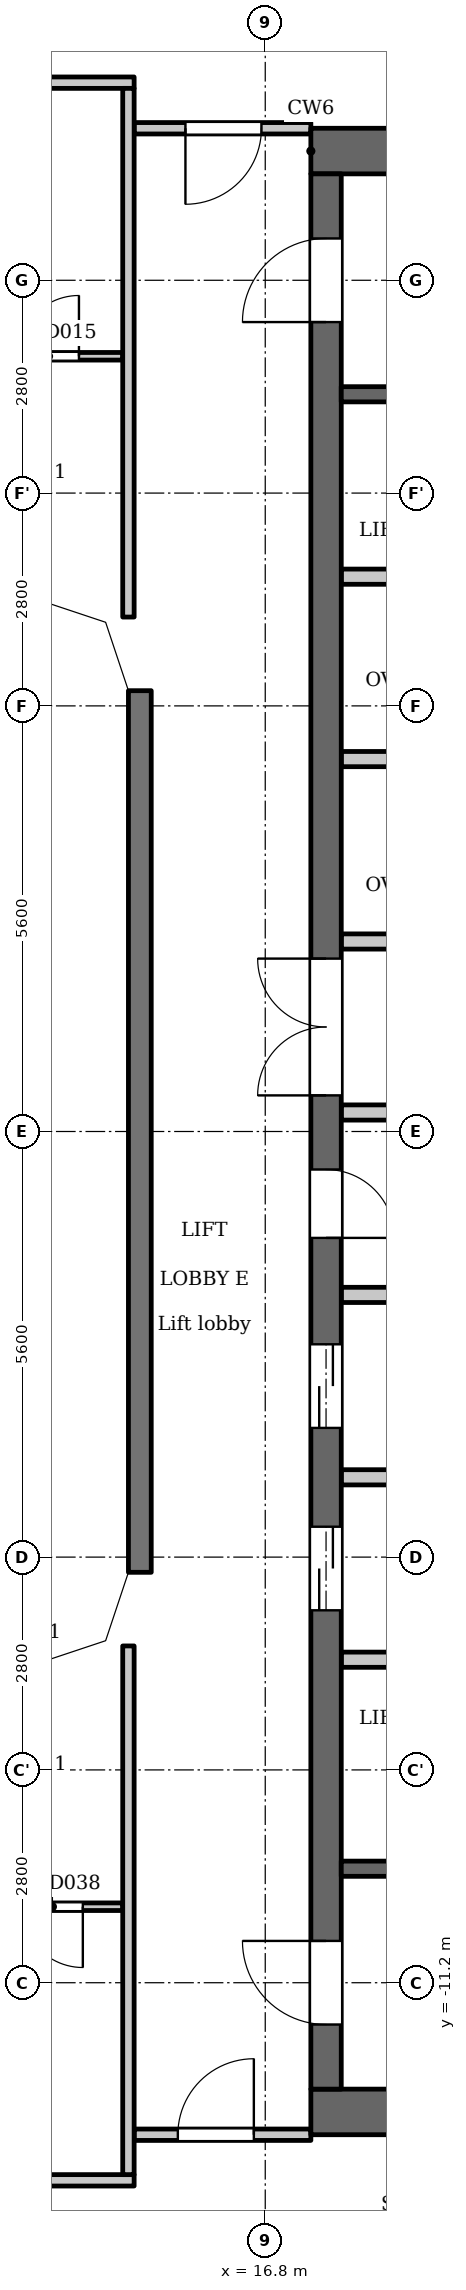
"""IFC4 building model, lengths in metres.
Left out: names, types, materials, properties, quantities, classifications, styles, units other than length and angle.
Written with IfcOpenShell. Run it as: python <this file> out.ifc"""

import sys

from ifc_helpers import new_model, si_unit, direction, frame, frame_2d, origin, place, context, subcontext, project, spatial, polyline, rectangle, outline, extrude, element, fill, save


model = new_model("IFC4")
c1 = context("Model", 3, precision=1e-05, world=origin(), true_north=direction((0.0, 1.0)))
c2 = subcontext(c1, "Body", "Model", "MODEL_VIEW")
j1 = project(units=[si_unit("LENGTHUNIT", "METRE"), si_unit("PLANEANGLEUNIT", "RADIAN")], contexts=[c1])
p1 = place(None, origin())
s1 = spatial("IfcSite", under=j1, at=p1, CompositionType="ELEMENT")
p2 = place(p1, origin())
s2 = spatial("IfcBuilding", under=s1, at=p2, CompositionType="ELEMENT")
p3 = place(p2, frame((0.0, 0.0, 245.2)))
s3 = spatial("IfcBuildingStorey", under=s2, at=p3, CompositionType="ELEMENT", Elevation=245.2)
p4 = place(p3, frame((15.15, 5.8, 0.0), z_axis=(0.0, 0.0, 1.0), x_axis=(0.0, -1.0, 0.0)))
e1 = element("IfcWall", 1, at=p4, inside=s3, PredefinedType="SOLIDWALL", context=c2, shape_type="SweptSolid", body=[
    extrude(rectangle(XDim=11.6, YDim=0.3, at=frame_2d((5.8, 0.0))), origin(), (0.0, 0.0, 1.0), 3.2),
])
for number, where, z_axis, x_axis in (
    (2, (17.4, 12.9, 0.0), (0.0, 0.0, 1.0), (1.0, 0.0, 0.0)),
    (3, (17.4, -12.9, 0.0), (0.0, 0.0, 1.0), (1.0, 0.0, 0.0)),
):
    element("IfcWall", number, at=place(p3, frame(where, z_axis=z_axis, x_axis=x_axis)), inside=s3, PredefinedType="SHEAR", context=c2, shape_type="SweptSolid", body=[
        extrude(rectangle(XDim=7.32, YDim=0.6, at=frame_2d((3.66, 0.0))), origin(), (0.0, 0.0, 1.0), 3.2),
    ])
p5 = place(p3, frame((17.6, -12.6, 0.0), z_axis=(0.0, 0.0, 1.0), x_axis=(0.0, 1.0, 0.0)))
e4 = element("IfcWall", 4, at=p5, inside=s3, PredefinedType="SHEAR", context=c2, shape_type="SweptSolid", body=[
    extrude(rectangle(XDim=25.2, YDim=0.4, at=frame_2d((12.6, 0.0))), origin(), (0.0, 0.0, 1.0), 3.2),
])
p6 = place(p5, frame((6.3, 0.0, 0.0)))
e5 = element("IfcOpeningElement", 5, at=p6, cuts=e4, PredefinedType="OPENING", context=c2, shape_type="SweptSolid", body=[
    extrude(rectangle(XDim=1.1, YDim=2.1, at=frame_2d((0.55, 1.05))), frame((0.0, 0.21, 0.0), z_axis=(0.0, -1.0, 0.0), x_axis=(1.0, 0.0, 0.0)), (0.0, 0.0, 1.0), 0.42),
])
p7 = place(p5, frame((8.7, 0.0, 0.0)))
e6 = element("IfcOpeningElement", 6, at=p7, cuts=e4, PredefinedType="OPENING", context=c2, shape_type="SweptSolid", body=[
    extrude(rectangle(XDim=1.1, YDim=2.1, at=frame_2d((0.55, 1.05))), frame((0.0, 0.21, 0.0), z_axis=(0.0, -1.0, 0.0), x_axis=(1.0, 0.0, 0.0)), (0.0, 0.0, 1.0), 0.42),
])
p8 = place(p5, frame((11.2, 0.0, 0.0)))
e7 = element("IfcOpeningElement", 7, at=p8, cuts=e4, PredefinedType="OPENING", context=c2, shape_type="SweptSolid", body=[
    extrude(rectangle(XDim=0.9, YDim=2.1, at=frame_2d((0.45, 1.05))), frame((0.0, 0.21, 0.0), z_axis=(0.0, -1.0, 0.0), x_axis=(1.0, 0.0, 0.0)), (0.0, 0.0, 1.0), 0.42),
])
p9 = place(p5, frame((23.25, 0.0, 0.0)))
e8 = element("IfcOpeningElement", 8, at=p9, cuts=e4, PredefinedType="OPENING", context=c2, shape_type="SweptSolid", body=[
    extrude(rectangle(XDim=1.1, YDim=2.1, at=frame_2d((0.55, 1.05))), frame((0.0, 0.21, 0.0), z_axis=(0.0, -1.0, 0.0), x_axis=(1.0, 0.0, 0.0)), (0.0, 0.0, 1.0), 0.42),
])
p10 = place(p5, frame((0.85, 0.0, 0.0)))
e9 = element("IfcOpeningElement", 9, at=p10, cuts=e4, PredefinedType="OPENING", context=c2, shape_type="SweptSolid", body=[
    extrude(rectangle(XDim=1.1, YDim=2.1, at=frame_2d((0.55, 1.05))), frame((0.0, 0.21, 0.0), z_axis=(0.0, -1.0, 0.0), x_axis=(1.0, 0.0, 0.0)), (0.0, 0.0, 1.0), 0.42),
])
p11 = place(p5, frame((13.075, 0.0, 0.0)))
e10 = element("IfcOpeningElement", 10, at=p11, cuts=e4, PredefinedType="OPENING", context=c2, shape_type="SweptSolid", body=[
    extrude(rectangle(XDim=1.8, YDim=2.1, at=frame_2d((0.9, 1.05))), frame((0.0, 0.21, 0.0), z_axis=(0.0, -1.0, 0.0), x_axis=(1.0, 0.0, 0.0)), (0.0, 0.0, 1.0), 0.42),
])
p12 = place(p3, frame((17.8, -9.7, 0.0), z_axis=(0.0, 0.0, 1.0), x_axis=(1.0, 0.0, 0.0)))
e11 = element("IfcWall", 11, at=p12, inside=s3, PredefinedType="SHEAR", context=c2, shape_type="SweptSolid", body=[
    extrude(rectangle(XDim=5.8, YDim=0.2, at=frame_2d((2.9, 0.0))), origin(), (0.0, 0.0, 1.0), 3.2),
])
p13 = place(p12, frame((0.85, 0.0, 0.0)))
e12 = element("IfcOpeningElement", 12, at=p13, cuts=e11, PredefinedType="OPENING", context=c2, shape_type="SweptSolid", body=[
    extrude(rectangle(XDim=1.1, YDim=2.1, at=frame_2d((0.55, 1.05))), frame((0.0, 0.11, 0.0), z_axis=(0.0, -1.0, 0.0), x_axis=(1.0, 0.0, 0.0)), (0.0, 0.0, 1.0), 0.22),
])
p14 = place(p12, frame((3.75, 0.0, 0.0)))
e13 = element("IfcOpeningElement", 13, at=p14, cuts=e11, PredefinedType="OPENING", context=c2, shape_type="SweptSolid", body=[
    extrude(rectangle(XDim=1.1, YDim=2.1, at=frame_2d((0.55, 1.05))), frame((0.0, 0.11, 0.0), z_axis=(0.0, -1.0, 0.0), x_axis=(1.0, 0.0, 0.0)), (0.0, 0.0, 1.0), 0.22),
])
for number, where, z_axis, x_axis in (
    (14, (17.8, -6.95, 0.0), (0.0, 0.0, 1.0), (1.0, 0.0, 0.0)),
    (15, (17.8, -4.55, 0.0), (0.0, 0.0, 1.0), (1.0, 0.0, 0.0)),
    (16, (17.8, -2.15, 0.0), (0.0, 0.0, 1.0), (1.0, 0.0, 0.0)),
):
    element("IfcWall", number, at=place(p3, frame(where, z_axis=z_axis, x_axis=x_axis)), inside=s3, PredefinedType="PARTITIONING", context=c2, shape_type="SweptSolid", body=[
        extrude(rectangle(XDim=2.8, YDim=0.2, at=frame_2d((1.4, 0.0))), origin(), (0.0, 0.0, 1.0), 3.2),
    ])
for number, where, z_axis, x_axis in (
    (17, (17.8, 0.25, 0.0), (0.0, 0.0, 1.0), (1.0, 0.0, 0.0)),
    (18, (17.8, 2.5, 0.0), (0.0, 0.0, 1.0), (1.0, 0.0, 0.0)),
):
    element("IfcWall", number, at=place(p3, frame(where, z_axis=z_axis, x_axis=x_axis)), inside=s3, PredefinedType="PARTITIONING", context=c2, shape_type="SweptSolid", body=[
        extrude(rectangle(XDim=3.0, YDim=0.2, at=frame_2d((1.5, 0.0))), origin(), (0.0, 0.0, 1.0), 3.2),
    ])
for number, where, z_axis, x_axis in (
    (19, (17.8, 4.9, 0.0), (0.0, 0.0, 1.0), (1.0, 0.0, 0.0)),
    (20, (17.8, 7.3, 0.0), (0.0, 0.0, 1.0), (1.0, 0.0, 0.0)),
):
    element("IfcWall", number, at=place(p3, frame(where, z_axis=z_axis, x_axis=x_axis)), inside=s3, PredefinedType="PARTITIONING", context=c2, shape_type="SweptSolid", body=[
        extrude(rectangle(XDim=2.8, YDim=0.2, at=frame_2d((1.4, 0.0))), origin(), (0.0, 0.0, 1.0), 3.2),
    ])
p15 = place(p3, frame((17.8, 9.7, 0.0), z_axis=(0.0, 0.0, 1.0), x_axis=(1.0, 0.0, 0.0)))
e21 = element("IfcWall", 21, at=p15, inside=s3, PredefinedType="SHEAR", context=c2, shape_type="SweptSolid", body=[
    extrude(rectangle(XDim=5.8, YDim=0.2, at=frame_2d((2.9, 0.0))), origin(), (0.0, 0.0, 1.0), 3.2),
])
p16 = place(p15, frame((0.85, 0.0, 0.0)))
e22 = element("IfcOpeningElement", 22, at=p16, cuts=e21, PredefinedType="OPENING", context=c2, shape_type="SweptSolid", body=[
    extrude(rectangle(XDim=1.1, YDim=2.1, at=frame_2d((0.55, 1.05))), frame((0.0, 0.11, 0.0), z_axis=(0.0, -1.0, 0.0), x_axis=(1.0, 0.0, 0.0)), (0.0, 0.0, 1.0), 0.22),
])
p17 = place(p15, frame((3.75, 0.0, 0.0)))
e23 = element("IfcOpeningElement", 23, at=p17, cuts=e21, PredefinedType="OPENING", context=c2, shape_type="SweptSolid", body=[
    extrude(rectangle(XDim=1.1, YDim=2.1, at=frame_2d((0.55, 1.05))), frame((0.0, 0.11, 0.0), z_axis=(0.0, -1.0, 0.0), x_axis=(1.0, 0.0, 0.0)), (0.0, 0.0, 1.0), 0.22),
])
p18 = place(p3, frame((-15.075, -13.8, 0.0), z_axis=(0.0, 0.0, 1.0), x_axis=(1.0, 0.0, 0.0)))
e24 = element("IfcWall", 24, at=p18, inside=s3, PredefinedType="PARTITIONING", context=c2, shape_type="SweptSolid", body=[
    extrude(rectangle(XDim=30.15, YDim=0.15, at=frame_2d((15.075, 0.0))), origin(), (0.0, 0.0, 1.0), 3.2),
])
p19 = place(p18, frame((2.225, 0.0, 0.0)))
e25 = element("IfcOpeningElement", 25, at=p19, cuts=e24, PredefinedType="OPENING", context=c2, shape_type="SweptSolid", body=[
    extrude(rectangle(XDim=1.0, YDim=2.1, at=frame_2d((0.5, 1.05))), frame((0.0, 0.085, 0.0), z_axis=(0.0, -1.0, 0.0), x_axis=(1.0, 0.0, 0.0)), (0.0, 0.0, 1.0), 0.17),
])
p20 = place(p18, frame((13.425, 0.0, 0.0)))
e26 = element("IfcOpeningElement", 26, at=p20, cuts=e24, PredefinedType="OPENING", context=c2, shape_type="SweptSolid", body=[
    extrude(rectangle(XDim=1.0, YDim=2.1, at=frame_2d((0.5, 1.05))), frame((0.0, 0.085, 0.0), z_axis=(0.0, -1.0, 0.0), x_axis=(1.0, 0.0, 0.0)), (0.0, 0.0, 1.0), 0.17),
])
p21 = place(p18, frame((24.625, 0.0, 0.0)))
e27 = element("IfcOpeningElement", 27, at=p21, cuts=e24, PredefinedType="OPENING", context=c2, shape_type="SweptSolid", body=[
    extrude(rectangle(XDim=1.0, YDim=2.1, at=frame_2d((0.5, 1.05))), frame((0.0, 0.085, 0.0), z_axis=(0.0, -1.0, 0.0), x_axis=(1.0, 0.0, 0.0)), (0.0, 0.0, 1.0), 0.17),
])
p22 = place(p3, frame((15.075, -13.2, 0.0), z_axis=(0.0, 0.0, 1.0), x_axis=(1.0, 0.0, 0.0)))
e28 = element("IfcWall", 28, at=p22, inside=s3, PredefinedType="PARTITIONING", context=c2, shape_type="SweptSolid", body=[
    extrude(rectangle(XDim=2.325, YDim=0.15, at=frame_2d((1.163, 0.0))), origin(), (0.0, 0.0, 1.0), 3.2),
])
p23 = place(p22, frame((0.575, 0.0, 0.0)))
e29 = element("IfcOpeningElement", 29, at=p23, cuts=e28, PredefinedType="OPENING", context=c2, shape_type="SweptSolid", body=[
    extrude(rectangle(XDim=1.0, YDim=2.1, at=frame_2d((0.5, 1.05))), frame((0.0, 0.085, 0.0), z_axis=(0.0, -1.0, 0.0), x_axis=(1.0, 0.0, 0.0)), (0.0, 0.0, 1.0), 0.17),
])
p24 = place(p3, frame((-14.925, -10.2, 0.0), z_axis=(0.0, 0.0, 1.0), x_axis=(1.0, 0.0, 0.0)))
e30 = element("IfcWall", 30, at=p24, inside=s3, PredefinedType="PARTITIONING", context=c2, shape_type="SweptSolid", body=[
    extrude(rectangle(XDim=29.85, YDim=0.1, at=frame_2d((14.925, 0.0))), origin(), (0.0, 0.0, 1.0), 3.2),
])
p25 = place(p24, frame((7.875, 0.0, 0.0)))
e31 = element("IfcOpeningElement", 31, at=p25, cuts=e30, PredefinedType="OPENING", context=c2, shape_type="SweptSolid", body=[
    extrude(rectangle(XDim=0.8, YDim=2.1, at=frame_2d((0.4, 1.05))), frame((0.0, 0.06, 0.0), z_axis=(0.0, -1.0, 0.0), x_axis=(1.0, 0.0, 0.0)), (0.0, 0.0, 1.0), 0.12),
])
p26 = place(p24, frame((2.175, 0.0, 0.0)))
e32 = element("IfcOpeningElement", 32, at=p26, cuts=e30, PredefinedType="OPENING", context=c2, shape_type="SweptSolid", body=[
    extrude(rectangle(XDim=0.9, YDim=2.1, at=frame_2d((0.45, 1.05))), frame((0.0, 0.06, 0.0), z_axis=(0.0, -1.0, 0.0), x_axis=(1.0, 0.0, 0.0)), (0.0, 0.0, 1.0), 0.12),
])
p27 = place(p24, frame((19.075, 0.0, 0.0)))
e33 = element("IfcOpeningElement", 33, at=p27, cuts=e30, PredefinedType="OPENING", context=c2, shape_type="SweptSolid", body=[
    extrude(rectangle(XDim=0.8, YDim=2.1, at=frame_2d((0.4, 1.05))), frame((0.0, 0.06, 0.0), z_axis=(0.0, -1.0, 0.0), x_axis=(1.0, 0.0, 0.0)), (0.0, 0.0, 1.0), 0.12),
])
p28 = place(p24, frame((13.375, 0.0, 0.0)))
e34 = element("IfcOpeningElement", 34, at=p28, cuts=e30, PredefinedType="OPENING", context=c2, shape_type="SweptSolid", body=[
    extrude(rectangle(XDim=0.9, YDim=2.1, at=frame_2d((0.45, 1.05))), frame((0.0, 0.06, 0.0), z_axis=(0.0, -1.0, 0.0), x_axis=(1.0, 0.0, 0.0)), (0.0, 0.0, 1.0), 0.12),
])
p29 = place(p24, frame((28.525, 0.0, 0.0)))
e35 = element("IfcOpeningElement", 35, at=p29, cuts=e30, PredefinedType="OPENING", context=c2, shape_type="SweptSolid", body=[
    extrude(rectangle(XDim=0.8, YDim=2.1, at=frame_2d((0.4, 1.05))), frame((0.0, 0.06, 0.0), z_axis=(0.0, -1.0, 0.0), x_axis=(1.0, 0.0, 0.0)), (0.0, 0.0, 1.0), 0.12),
])
p30 = place(p24, frame((24.575, 0.0, 0.0)))
e36 = element("IfcOpeningElement", 36, at=p30, cuts=e30, PredefinedType="OPENING", context=c2, shape_type="SweptSolid", body=[
    extrude(rectangle(XDim=0.9, YDim=2.1, at=frame_2d((0.45, 1.05))), frame((0.0, 0.06, 0.0), z_axis=(0.0, -1.0, 0.0), x_axis=(1.0, 0.0, 0.0)), (0.0, 0.0, 1.0), 0.12),
])
p31 = place(p3, frame((-14.925, 10.2, 0.0), z_axis=(0.0, 0.0, 1.0), x_axis=(1.0, 0.0, 0.0)))
e37 = element("IfcWall", 37, at=p31, inside=s3, PredefinedType="PARTITIONING", context=c2, shape_type="SweptSolid", body=[
    extrude(rectangle(XDim=29.85, YDim=0.1, at=frame_2d((14.925, 0.0))), origin(), (0.0, 0.0, 1.0), 3.2),
])
p32 = place(p31, frame((13.475, 0.0, 0.0)))
e38 = element("IfcOpeningElement", 38, at=p32, cuts=e37, PredefinedType="OPENING", context=c2, shape_type="SweptSolid", body=[
    extrude(rectangle(XDim=0.9, YDim=2.1, at=frame_2d((0.45, 1.05))), frame((0.0, 0.06, 0.0), z_axis=(0.0, -1.0, 0.0), x_axis=(1.0, 0.0, 0.0)), (0.0, 0.0, 1.0), 0.12),
])
p33 = place(p31, frame((4.375, 0.0, 0.0)))
e39 = element("IfcOpeningElement", 39, at=p33, cuts=e37, PredefinedType="OPENING", context=c2, shape_type="SweptSolid", body=[
    extrude(rectangle(XDim=0.9, YDim=2.1, at=frame_2d((0.45, 1.05))), frame((0.0, 0.06, 0.0), z_axis=(0.0, -1.0, 0.0), x_axis=(1.0, 0.0, 0.0)), (0.0, 0.0, 1.0), 0.12),
])
p34 = place(p31, frame((15.475, 0.0, 0.0)))
e40 = element("IfcOpeningElement", 40, at=p34, cuts=e37, PredefinedType="OPENING", context=c2, shape_type="SweptSolid", body=[
    extrude(rectangle(XDim=0.8, YDim=2.1, at=frame_2d((0.4, 1.05))), frame((0.0, 0.06, 0.0), z_axis=(0.0, -1.0, 0.0), x_axis=(1.0, 0.0, 0.0)), (0.0, 0.0, 1.0), 0.12),
])
p35 = place(p31, frame((18.825, 0.0, 0.0)))
e41 = element("IfcOpeningElement", 41, at=p35, cuts=e37, PredefinedType="OPENING", context=c2, shape_type="SweptSolid", body=[
    extrude(rectangle(XDim=0.9, YDim=2.1, at=frame_2d((0.45, 1.05))), frame((0.0, 0.06, 0.0), z_axis=(0.0, -1.0, 0.0), x_axis=(1.0, 0.0, 0.0)), (0.0, 0.0, 1.0), 0.12),
])
p36 = place(p31, frame((28.474, 0.0, 0.0)))
e42 = element("IfcOpeningElement", 42, at=p36, cuts=e37, PredefinedType="OPENING", context=c2, shape_type="SweptSolid", body=[
    extrude(rectangle(XDim=0.8, YDim=2.1, at=frame_2d((0.4, 1.05))), frame((0.0, 0.06, 0.0), z_axis=(0.0, -1.0, 0.0), x_axis=(1.0, 0.0, 0.0)), (0.0, 0.0, 1.0), 0.12),
])
p37 = place(p31, frame((24.675, 0.0, 0.0)))
e43 = element("IfcOpeningElement", 43, at=p37, cuts=e37, PredefinedType="OPENING", context=c2, shape_type="SweptSolid", body=[
    extrude(rectangle(XDim=0.9, YDim=2.1, at=frame_2d((0.45, 1.05))), frame((0.0, 0.06, 0.0), z_axis=(0.0, -1.0, 0.0), x_axis=(1.0, 0.0, 0.0)), (0.0, 0.0, 1.0), 0.12),
])
p38 = place(p3, frame((15.075, 13.2, 0.0), z_axis=(0.0, 0.0, 1.0), x_axis=(1.0, 0.0, 0.0)))
e44 = element("IfcWall", 44, at=p38, inside=s3, PredefinedType="PARTITIONING", context=c2, shape_type="SweptSolid", body=[
    extrude(rectangle(XDim=2.325, YDim=0.15, at=frame_2d((1.163, 0.0))), origin(), (0.0, 0.0, 1.0), 3.2),
])
p39 = place(p38, frame((0.675, 0.0, 0.0)))
e45 = element("IfcOpeningElement", 45, at=p39, cuts=e44, PredefinedType="OPENING", context=c2, shape_type="SweptSolid", body=[
    extrude(rectangle(XDim=1.0, YDim=2.1, at=frame_2d((0.5, 1.05))), frame((0.0, 0.085, 0.0), z_axis=(0.0, -1.0, 0.0), x_axis=(1.0, 0.0, 0.0)), (0.0, 0.0, 1.0), 0.17),
])
p40 = place(p3, frame((-15.075, 13.8, 0.0), z_axis=(0.0, 0.0, 1.0), x_axis=(1.0, 0.0, 0.0)))
e46 = element("IfcWall", 46, at=p40, inside=s3, PredefinedType="PARTITIONING", context=c2, shape_type="SweptSolid", body=[
    extrude(rectangle(XDim=30.15, YDim=0.15, at=frame_2d((15.075, 0.0))), origin(), (0.0, 0.0, 1.0), 3.2),
])
p41 = place(p40, frame((10.125, 0.0, 0.0)))
e47 = element("IfcOpeningElement", 47, at=p41, cuts=e46, PredefinedType="OPENING", context=c2, shape_type="SweptSolid", body=[
    extrude(rectangle(XDim=1.0, YDim=2.1, at=frame_2d((0.5, 1.05))), frame((0.0, 0.085, 0.0), z_axis=(0.0, -1.0, 0.0), x_axis=(1.0, 0.0, 0.0)), (0.0, 0.0, 1.0), 0.17),
])
p42 = place(p40, frame((18.975, 0.0, 0.0)))
e48 = element("IfcOpeningElement", 48, at=p42, cuts=e46, PredefinedType="OPENING", context=c2, shape_type="SweptSolid", body=[
    extrude(rectangle(XDim=1.0, YDim=2.1, at=frame_2d((0.5, 1.05))), frame((0.0, 0.085, 0.0), z_axis=(0.0, -1.0, 0.0), x_axis=(1.0, 0.0, 0.0)), (0.0, 0.0, 1.0), 0.17),
])
p43 = place(p40, frame((24.575, 0.0, 0.0)))
e49 = element("IfcOpeningElement", 49, at=p43, cuts=e46, PredefinedType="OPENING", context=c2, shape_type="SweptSolid", body=[
    extrude(rectangle(XDim=1.0, YDim=2.1, at=frame_2d((0.5, 1.05))), frame((0.0, 0.085, 0.0), z_axis=(0.0, -1.0, 0.0), x_axis=(1.0, 0.0, 0.0)), (0.0, 0.0, 1.0), 0.17),
])
for number, where, z_axis, x_axis in (
    (50, (15.0, -13.725, 0.0), (0.0, 0.0, 1.0), (0.0, 1.0, 0.0)),
    (51, (15.0, 6.769, 0.0), (0.0, 0.0, 1.0), (0.0, 1.0, 0.0)),
):
    element("IfcWall", number, at=place(p3, frame(where, z_axis=z_axis, x_axis=x_axis)), inside=s3, PredefinedType="PARTITIONING", context=c2, shape_type="SweptSolid", body=[
        extrude(rectangle(XDim=6.956, YDim=0.15, at=frame_2d((3.478, 0.0))), origin(), (0.0, 0.0, 1.0), 3.2),
    ])
p44 = place(p3, origin())
e52 = element("IfcWall", 52, at=p44, inside=s3, PredefinedType="SOLIDWALL", context=c2, shape_type="SweptSolid", body=[
    extrude(outline(polyline([(14.937, 6.937), (13.849, 7.3), (13.8, 7.3), (13.8, 7.0), (14.7, 6.7), (15.0, 5.8), (15.3, 5.8), (15.3, 5.849), (14.937, 6.937)])), origin(), (0.0, 0.0, 1.0), 3.2),
])
e53 = element("IfcWall", 53, at=p44, inside=s3, PredefinedType="SOLIDWALL", context=c2, shape_type="SweptSolid", body=[
    extrude(outline(polyline([(14.937, -6.937), (15.3, -5.849), (15.3, -5.8), (15.0, -5.8), (14.7, -6.7), (13.8, -7.0), (13.8, -7.3), (13.849, -7.3), (14.937, -6.937)])), origin(), (0.0, 0.0, 1.0), 3.2),
])
p45 = place(p6, origin())
e54 = element("IfcDoor", 54, at=p45, inside=s3, OperationType="DOUBLE_DOOR_SLIDING", PredefinedType="DOOR", context=c2, shape_type="SweptSolid", body=[
    extrude(rectangle(XDim=1.1, YDim=2.1, at=frame_2d((0.55, 1.05))), frame((0.0, 0.025, 0.0), z_axis=(0.0, -1.0, 0.0), x_axis=(1.0, 0.0, 0.0)), (0.0, 0.0, 1.0), 0.05),
])
fill(e5, e54)
p46 = place(p7, origin())
e55 = element("IfcDoor", 55, at=p46, inside=s3, OperationType="DOUBLE_DOOR_SLIDING", PredefinedType="DOOR", context=c2, shape_type="SweptSolid", body=[
    extrude(rectangle(XDim=1.1, YDim=2.1, at=frame_2d((0.55, 1.05))), frame((0.0, 0.025, 0.0), z_axis=(0.0, -1.0, 0.0), x_axis=(1.0, 0.0, 0.0)), (0.0, 0.0, 1.0), 0.05),
])
fill(e6, e55)
p47 = place(p8, origin())
e56 = element("IfcDoor", 56, at=p47, inside=s3, OperationType="SINGLE_SWING_LEFT", PredefinedType="DOOR", context=c2, shape_type="SweptSolid", body=[
    extrude(rectangle(XDim=0.9, YDim=2.1, at=frame_2d((0.45, 1.05))), frame((0.0, 0.025, 0.0), z_axis=(0.0, -1.0, 0.0), x_axis=(1.0, 0.0, 0.0)), (0.0, 0.0, 1.0), 0.05),
])
fill(e7, e56)
p48 = place(p9, origin())
e57 = element("IfcDoor", 57, at=p48, inside=s3, OperationType="SINGLE_SWING_RIGHT", PredefinedType="DOOR", context=c2, shape_type="SweptSolid", body=[
    extrude(rectangle(XDim=1.1, YDim=2.1, at=frame_2d((0.55, 1.05))), frame((0.0, 0.025, 0.0), z_axis=(0.0, -1.0, 0.0), x_axis=(1.0, 0.0, 0.0)), (0.0, 0.0, 1.0), 0.05),
])
fill(e8, e57)
p49 = place(p10, origin())
e58 = element("IfcDoor", 58, at=p49, inside=s3, OperationType="SINGLE_SWING_LEFT", PredefinedType="DOOR", context=c2, shape_type="SweptSolid", body=[
    extrude(rectangle(XDim=1.1, YDim=2.1, at=frame_2d((0.55, 1.05))), frame((0.0, 0.025, 0.0), z_axis=(0.0, -1.0, 0.0), x_axis=(1.0, 0.0, 0.0)), (0.0, 0.0, 1.0), 0.05),
])
fill(e9, e58)
p50 = place(p11, origin())
e59 = element("IfcDoor", 59, at=p50, inside=s3, OperationType="DOUBLE_DOOR_SINGLE_SWING", PredefinedType="DOOR", context=c2, shape_type="SweptSolid", body=[
    extrude(rectangle(XDim=1.8, YDim=2.1, at=frame_2d((0.9, 1.05))), frame((0.0, 0.025, 0.0), z_axis=(0.0, -1.0, 0.0), x_axis=(1.0, 0.0, 0.0)), (0.0, 0.0, 1.0), 0.05),
])
fill(e10, e59)
p51 = place(p39, origin())
e60 = element("IfcDoor", 60, at=p51, inside=s3, OperationType="SINGLE_SWING_LEFT", PredefinedType="DOOR", context=c2, shape_type="SweptSolid", body=[
    extrude(rectangle(XDim=1.0, YDim=2.1, at=frame_2d((0.5, 1.05))), frame((0.0, 0.025, 0.0), z_axis=(0.0, -1.0, 0.0), x_axis=(1.0, 0.0, 0.0)), (0.0, 0.0, 1.0), 0.05),
])
fill(e45, e60)
p52 = place(p23, origin())
e61 = element("IfcDoor", 61, at=p52, inside=s3, OperationType="SINGLE_SWING_LEFT", PredefinedType="DOOR", context=c2, shape_type="SweptSolid", body=[
    extrude(rectangle(XDim=1.0, YDim=2.1, at=frame_2d((0.5, 1.05))), frame((0.0, 0.025, 0.0), z_axis=(0.0, -1.0, 0.0), x_axis=(1.0, 0.0, 0.0)), (0.0, 0.0, 1.0), 0.05),
])
fill(e29, e61)
p53 = place(p36, origin())
e62 = element("IfcDoor", 62, at=p53, inside=s3, OperationType="SINGLE_SWING_LEFT", PredefinedType="DOOR", context=c2, shape_type="SweptSolid", body=[
    extrude(rectangle(XDim=0.8, YDim=2.1, at=frame_2d((0.4, 1.05))), frame((0.0, 0.025, 0.0), z_axis=(0.0, -1.0, 0.0), x_axis=(1.0, 0.0, 0.0)), (0.0, 0.0, 1.0), 0.05),
])
fill(e42, e62)
p54 = place(p29, origin())
e63 = element("IfcDoor", 63, at=p54, inside=s3, OperationType="SINGLE_SWING_RIGHT", PredefinedType="DOOR", context=c2, shape_type="SweptSolid", body=[
    extrude(rectangle(XDim=0.8, YDim=2.1, at=frame_2d((0.4, 1.05))), frame((0.0, 0.025, 0.0), z_axis=(0.0, -1.0, 0.0), x_axis=(1.0, 0.0, 0.0)), (0.0, 0.0, 1.0), 0.05),
])
fill(e35, e63)
save(model, sys.argv[1])
